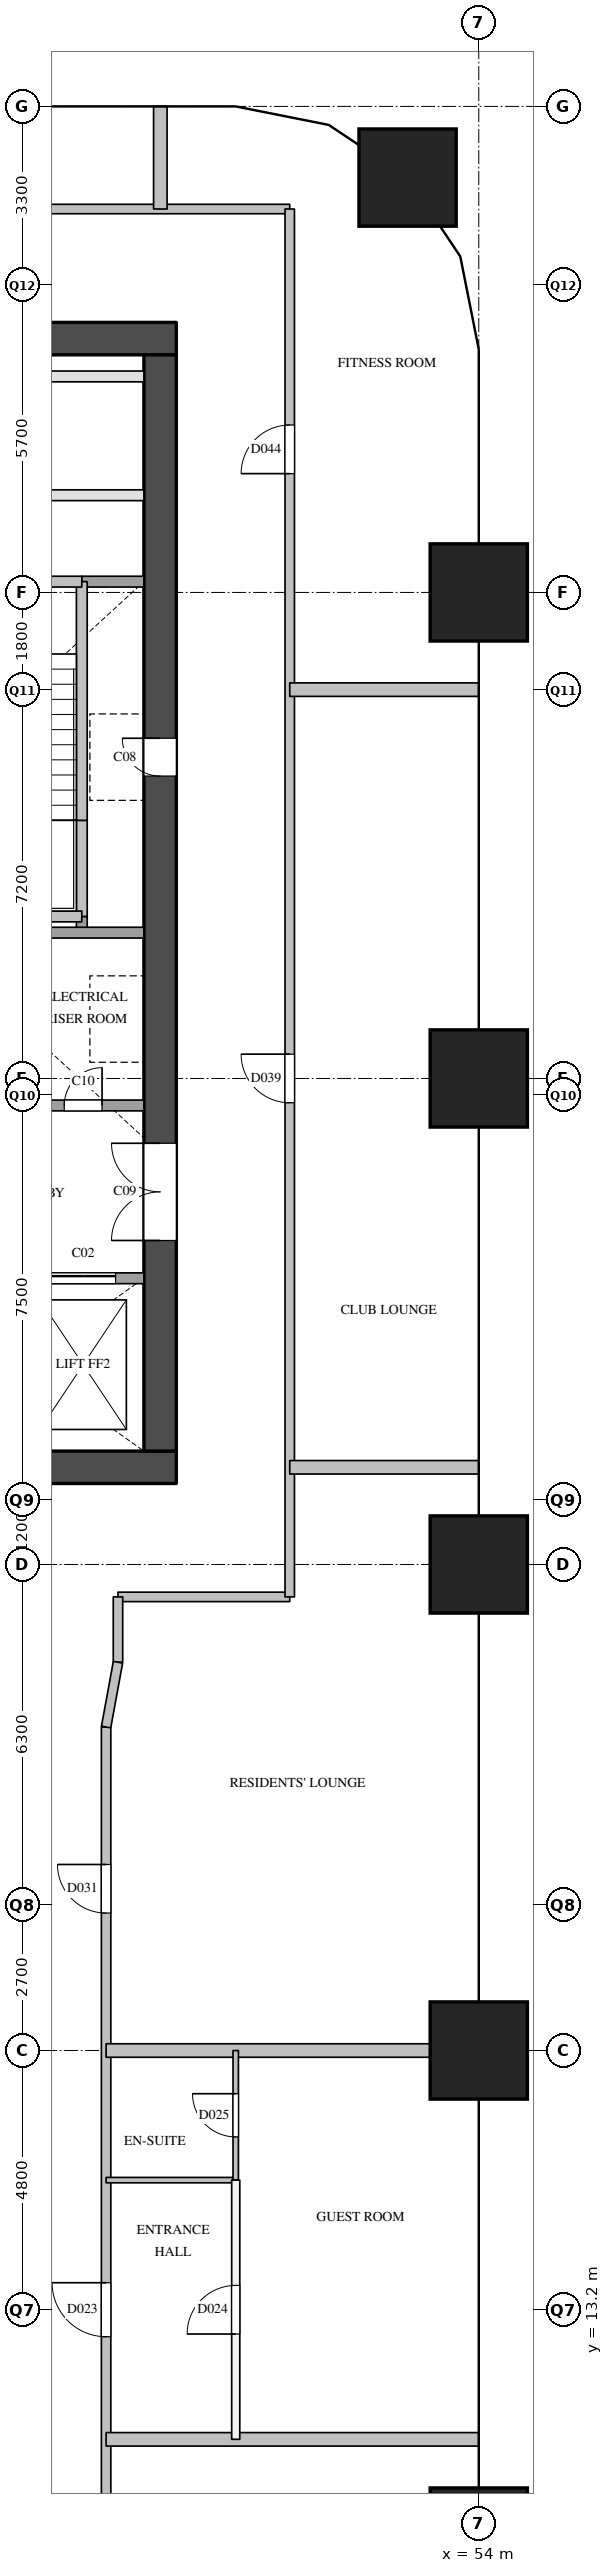
"""IFC4 building model, lengths in metres.
Left out: names, types, materials, properties, quantities, classifications, styles, units other than length and angle.
Written with IfcOpenShell. Run it as: python <this file> out.ifc"""

import sys

from ifc_helpers import new_model, si_unit, direction, frame, frame_2d, origin, origin_2d, place, context, subcontext, project, spatial, rectangle, extrude, element, fill, save


model = new_model("IFC4")
c1 = context("Model", 3, precision=1e-05, world=origin(), true_north=direction((0.0, 1.0)))
c2 = subcontext(c1, "Body", "Model", "MODEL_VIEW")
j1 = project(units=[si_unit("LENGTHUNIT", "METRE"), si_unit("PLANEANGLEUNIT", "RADIAN")], contexts=[c1])
p1 = place(None, origin())
s1 = spatial("IfcSite", under=j1, at=p1, CompositionType="ELEMENT")
p2 = place(p1, origin())
s2 = spatial("IfcBuilding", under=s1, at=p2, CompositionType="ELEMENT")
p3 = place(p2, frame((0.0, 0.0, 69.0)))
s3 = spatial("IfcBuildingStorey", under=s2, at=p3, CompositionType="ELEMENT", Elevation=69.0)
for number, where, z_axis, x_axis in (
    (1, (54.0, 9.0, 0.0), (0.0, 0.0, 1.0), (1.0, 0.0, 0.0)),
    (2, (54.0, 18.0, 0.0), (0.0, 0.0, 1.0), (1.0, 0.0, 0.0)),
    (3, (54.0, 27.0, 0.0), (0.0, 0.0, 1.0), (1.0, 0.0, 0.0)),
    (4, (54.0, 36.0, 0.0), (0.0, 0.0, 1.0), (1.0, 0.0, 0.0)),
    (5, (54.0, 45.0, 0.0), (0.0, 0.0, 1.0), (1.0, 0.0, 0.0)),
    (6, (52.682, 52.682, 0.0), (0.0, 0.0, 1.0), (1.0, 0.0, 0.0)),
):
    element("IfcColumn", number, at=place(p3, frame(where, z_axis=z_axis, x_axis=x_axis)), inside=s3, PredefinedType="COLUMN", context=c2, shape_type="SweptSolid", body=[
        extrude(rectangle(XDim=1.8, YDim=1.8, at=origin_2d()), origin(), (0.0, 0.0, 1.0), 3.8),
    ])
for number, where, z_axis, x_axis in (
    (7, (36.0, 28.8, 0.0), (0.0, 0.0, 1.0), (1.0, 0.0, 0.0)),
    (8, (36.0, 49.7, 0.0), (0.0, 0.0, 1.0), (1.0, 0.0, 0.0)),
):
    element("IfcWall", number, at=place(p3, frame(where, z_axis=z_axis, x_axis=x_axis)), inside=s3, PredefinedType="SHEAR", context=c2, shape_type="SweptSolid", body=[
        extrude(rectangle(XDim=12.4, YDim=0.6, at=frame_2d((6.2, 0.0))), origin(), (0.0, 0.0, 1.0), 3.5),
    ])
p4 = place(p3, frame((48.1, 29.1, 0.0), z_axis=(0.0, 0.0, 1.0), x_axis=(0.0, 1.0, 0.0)))
e9 = element("IfcWall", 9, at=p4, inside=s3, PredefinedType="SHEAR", context=c2, shape_type="SweptSolid", body=[
    extrude(rectangle(XDim=20.3, YDim=0.6, at=frame_2d((10.15, 0.0))), origin(), (0.0, 0.0, 1.0), 3.5),
])
p5 = place(p4, frame((12.5, 0.0, 0.0)))
e10 = element("IfcOpeningElement", 10, at=p5, cuts=e9, PredefinedType="OPENING", context=c2, shape_type="SweptSolid", body=[
    extrude(rectangle(XDim=0.7, YDim=2.1, at=frame_2d((0.35, 1.05))), frame((0.0, 0.31, 0.0), z_axis=(0.0, -1.0, 0.0), x_axis=(1.0, 0.0, 0.0)), (0.0, 0.0, 1.0), 0.62),
])
p6 = place(p4, frame((3.9, 0.0, 0.0)))
e11 = element("IfcOpeningElement", 11, at=p6, cuts=e9, PredefinedType="OPENING", context=c2, shape_type="SweptSolid", body=[
    extrude(rectangle(XDim=1.8, YDim=2.1, at=frame_2d((0.9, 1.05))), frame((0.0, 0.31, 0.0), z_axis=(0.0, -1.0, 0.0), x_axis=(1.0, 0.0, 0.0)), (0.0, 0.0, 1.0), 0.62),
])
p7 = place(p3, frame((46.65, 38.7, 0.0), z_axis=(0.0, 0.0, 1.0), x_axis=(0.0, 1.0, 0.0)))
e12 = element("IfcWall", 12, at=p7, inside=s3, PredefinedType="SOLIDWALL", context=c2, shape_type="SweptSolid", body=[
    extrude(rectangle(XDim=0.3, YDim=0.2, at=frame_2d((0.15, 0.0))), origin(), (0.0, 0.0, 1.0), 3.5),
])
p8 = place(p3, frame((46.65, 39.0, 0.0), z_axis=(0.0, 0.0, 1.0), x_axis=(0.0, 1.0, 0.0)))
e13 = element("IfcWall", 13, at=p8, inside=s3, PredefinedType="SOLIDWALL", context=c2, shape_type="SweptSolid", body=[
    extrude(rectangle(XDim=1.78, YDim=0.2, at=frame_2d((0.89, 0.0))), origin(), (0.0, 0.0, 1.0), 3.5),
])
p9 = place(p3, frame((46.65, 40.78, 0.0), z_axis=(0.0, 0.0, 1.0), x_axis=(0.0, 1.0, 0.0)))
e14 = element("IfcWall", 14, at=p9, inside=s3, PredefinedType="SOLIDWALL", context=c2, shape_type="SweptSolid", body=[
    extrude(rectangle(XDim=4.42, YDim=0.2, at=frame_2d((2.21, 0.0))), origin(), (0.0, 0.0, 1.0), 3.5),
])
p10 = place(p3, frame((36.6, 32.3, 0.0), z_axis=(0.0, 0.0, 1.0), x_axis=(1.0, 0.0, 0.0)))
e15 = element("IfcWall", 15, at=p10, inside=s3, PredefinedType="SOLIDWALL", context=c2, shape_type="SweptSolid", body=[
    extrude(rectangle(XDim=11.2, YDim=0.2, at=frame_2d((5.6, 0.0))), origin(), (0.0, 0.0, 1.0), 3.5),
])
p11 = place(p10, frame((7.225, 0.0, 0.0)))
e16 = element("IfcOpeningElement", 16, at=p11, cuts=e15, PredefinedType="OPENING", context=c2, shape_type="SweptSolid", body=[
    extrude(rectangle(XDim=1.2, YDim=2.1, at=frame_2d((0.6, 1.05))), frame((0.0, 0.11, 0.0), z_axis=(0.0, -1.0, 0.0), x_axis=(1.0, 0.0, 0.0)), (0.0, 0.0, 1.0), 0.22),
])
p12 = place(p10, frame((9.475, 0.0, 0.0)))
e17 = element("IfcOpeningElement", 17, at=p12, cuts=e15, PredefinedType="OPENING", context=c2, shape_type="SweptSolid", body=[
    extrude(rectangle(XDim=1.2, YDim=2.1, at=frame_2d((0.6, 1.05))), frame((0.0, 0.11, 0.0), z_axis=(0.0, -1.0, 0.0), x_axis=(1.0, 0.0, 0.0)), (0.0, 0.0, 1.0), 0.22),
])
p13 = place(p3, frame((43.3, 35.5, 0.0), z_axis=(0.0, 0.0, 1.0), x_axis=(1.0, 0.0, 0.0)))
e18 = element("IfcWall", 18, at=p13, inside=s3, PredefinedType="SOLIDWALL", context=c2, shape_type="SweptSolid", body=[
    extrude(rectangle(XDim=4.5, YDim=0.2, at=frame_2d((2.25, 0.0))), origin(), (0.0, 0.0, 1.0), 3.5),
])
p14 = place(p13, frame((0.525, 0.0, 0.0)))
e19 = element("IfcOpeningElement", 19, at=p14, cuts=e18, PredefinedType="OPENING", context=c2, shape_type="SweptSolid", body=[
    extrude(rectangle(XDim=1.2, YDim=2.1, at=frame_2d((0.6, 1.05))), frame((0.0, 0.11, 0.0), z_axis=(0.0, -1.0, 0.0), x_axis=(1.0, 0.0, 0.0)), (0.0, 0.0, 1.0), 0.22),
])
p15 = place(p13, frame((3.025, 0.0, 0.0)))
e20 = element("IfcOpeningElement", 20, at=p15, cuts=e18, PredefinedType="OPENING", context=c2, shape_type="SweptSolid", body=[
    extrude(rectangle(XDim=0.7, YDim=2.1, at=frame_2d((0.35, 1.05))), frame((0.0, 0.11, 0.0), z_axis=(0.0, -1.0, 0.0), x_axis=(1.0, 0.0, 0.0)), (0.0, 0.0, 1.0), 0.22),
])
p16 = place(p3, frame((43.3, 38.7, 0.0), z_axis=(0.0, 0.0, 1.0), x_axis=(1.0, 0.0, 0.0)))
e21 = element("IfcWall", 21, at=p16, inside=s3, PredefinedType="SOLIDWALL", context=c2, shape_type="SweptSolid", body=[
    extrude(rectangle(XDim=4.5, YDim=0.2, at=frame_2d((2.25, 0.0))), origin(), (0.0, 0.0, 1.0), 3.5),
])
p17 = place(p3, frame((43.4, 39.0, 0.0), z_axis=(0.0, 0.0, 1.0), x_axis=(1.0, 0.0, 0.0)))
e22 = element("IfcWall", 22, at=p17, inside=s3, PredefinedType="SOLIDWALL", context=c2, shape_type="SweptSolid", body=[
    extrude(rectangle(XDim=3.25, YDim=0.2, at=frame_2d((1.625, 0.0))), origin(), (0.0, 0.0, 1.0), 3.5),
])
p18 = place(p3, frame((46.65, 45.2, 0.0), z_axis=(0.0, 0.0, 1.0), x_axis=(1.0, 0.0, 0.0)))
e23 = element("IfcWall", 23, at=p18, inside=s3, PredefinedType="SOLIDWALL", context=c2, shape_type="SweptSolid", body=[
    extrude(rectangle(XDim=1.15, YDim=0.2, at=frame_2d((0.575, 0.0))), origin(), (0.0, 0.0, 1.0), 3.5),
])
p19 = place(p3, frame((36.6, 45.2, 0.0), z_axis=(0.0, 0.0, 1.0), x_axis=(1.0, 0.0, 0.0)))
e24 = element("IfcWall", 24, at=p19, inside=s3, PredefinedType="SOLIDWALL", context=c2, shape_type="SweptSolid", body=[
    extrude(rectangle(XDim=10.05, YDim=0.2, at=frame_2d((5.025, 0.0))), origin(), (0.0, 0.0, 1.0), 3.5),
])
p20 = place(p19, frame((1.125, 0.0, 0.0)))
e25 = element("IfcOpeningElement", 25, at=p20, cuts=e24, PredefinedType="OPENING", context=c2, shape_type="SweptSolid", body=[
    extrude(rectangle(XDim=1.1, YDim=2.1, at=frame_2d((0.55, 1.05))), frame((0.0, 0.11, 0.0), z_axis=(0.0, -1.0, 0.0), x_axis=(1.0, 0.0, 0.0)), (0.0, 0.0, 1.0), 0.22),
])
p21 = place(p19, frame((4.475, 0.0, 0.0)))
e26 = element("IfcOpeningElement", 26, at=p21, cuts=e24, PredefinedType="OPENING", context=c2, shape_type="SweptSolid", body=[
    extrude(rectangle(XDim=1.1, YDim=2.1, at=frame_2d((0.55, 1.05))), frame((0.0, 0.11, 0.0), z_axis=(0.0, -1.0, 0.0), x_axis=(1.0, 0.0, 0.0)), (0.0, 0.0, 1.0), 0.22),
])
p22 = place(p19, frame((7.825, 0.0, 0.0)))
e27 = element("IfcOpeningElement", 27, at=p22, cuts=e24, PredefinedType="OPENING", context=c2, shape_type="SweptSolid", body=[
    extrude(rectangle(XDim=1.1, YDim=2.1, at=frame_2d((0.55, 1.05))), frame((0.0, 0.11, 0.0), z_axis=(0.0, -1.0, 0.0), x_axis=(1.0, 0.0, 0.0)), (0.0, 0.0, 1.0), 0.22),
])
p23 = place(p3, frame((36.6, 46.8, 0.0), z_axis=(0.0, 0.0, 1.0), x_axis=(1.0, 0.0, 0.0)))
e28 = element("IfcWall", 28, at=p23, inside=s3, PredefinedType="PARTITIONING", context=c2, shape_type="SweptSolid", body=[
    extrude(rectangle(XDim=11.2, YDim=0.2, at=frame_2d((5.6, 0.0))), origin(), (0.0, 0.0, 1.0), 3.5),
])
p24 = place(p23, frame((2.07, 0.0, 0.0)))
e29 = element("IfcOpeningElement", 29, at=p24, cuts=e28, PredefinedType="OPENING", context=c2, shape_type="SweptSolid", body=[
    extrude(rectangle(XDim=0.9, YDim=2.1, at=frame_2d((0.45, 1.05))), frame((0.0, 0.11, 0.0), z_axis=(0.0, -1.0, 0.0), x_axis=(1.0, 0.0, 0.0)), (0.0, 0.0, 1.0), 0.22),
])
p25 = place(p23, frame((7.67, 0.0, 0.0)))
e30 = element("IfcOpeningElement", 30, at=p25, cuts=e28, PredefinedType="OPENING", context=c2, shape_type="SweptSolid", body=[
    extrude(rectangle(XDim=0.9, YDim=2.1, at=frame_2d((0.45, 1.05))), frame((0.0, 0.11, 0.0), z_axis=(0.0, -1.0, 0.0), x_axis=(1.0, 0.0, 0.0)), (0.0, 0.0, 1.0), 0.22),
])
p26 = place(p3, frame((36.6, 49.0, 0.0), z_axis=(0.0, 0.0, 1.0), x_axis=(1.0, 0.0, 0.0)))
e31 = element("IfcWall", 31, at=p26, inside=s3, PredefinedType="PARTITIONING", context=c2, shape_type="SweptSolid", body=[
    extrude(rectangle(XDim=11.2, YDim=0.2, at=frame_2d((5.6, 0.0))), origin(), (0.0, 0.0, 1.0), 3.5),
])
p27 = place(p3, frame((47.32, 26.4, 0.0), z_axis=(0.0, 0.0, 1.0), x_axis=(1.0, 0.0, 0.0)))
e32 = element("IfcWall", 32, at=p27, inside=s3, PredefinedType="PARTITIONING", context=c2, shape_type="SweptSolid", body=[
    extrude(rectangle(XDim=3.18, YDim=0.175, at=frame_2d((1.59, 0.0))), origin(), (0.0, 0.0, 1.0), 3.5),
])
p28 = place(p3, frame((33.9, 52.1, 0.0), z_axis=(0.0, 0.0, 1.0), x_axis=(1.0, 0.0, 0.0)))
e33 = element("IfcWall", 33, at=p28, inside=s3, PredefinedType="PARTITIONING", context=c2, shape_type="SweptSolid", body=[
    extrude(rectangle(XDim=16.6, YDim=0.175, at=frame_2d((8.3, 0.0))), origin(), (0.0, 0.0, 1.0), 3.5),
])
p29 = place(p28, frame((7.702, 0.0, 0.0)))
e34 = element("IfcOpeningElement", 34, at=p29, cuts=e33, PredefinedType="OPENING", context=c2, shape_type="SweptSolid", body=[
    extrude(rectangle(XDim=0.9, YDim=2.1, at=frame_2d((0.45, 1.05))), frame((0.0, 0.097, 0.0), z_axis=(0.0, -1.0, 0.0), x_axis=(1.0, 0.0, 0.0)), (0.0, 0.0, 1.0), 0.195),
])
p30 = place(p3, frame((47.1, 6.9, 0.0), z_axis=(0.0, 0.0, 1.0), x_axis=(0.0, 1.0, 0.0)))
e35 = element("IfcWall", 35, at=p30, inside=s3, PredefinedType="PARTITIONING", context=c2, shape_type="SweptSolid", body=[
    extrude(rectangle(XDim=17.09, YDim=0.175, at=frame_2d((8.545, 0.0))), origin(), (0.0, 0.0, 1.0), 3.5),
])
p31 = place(p30, frame((1.5, 0.0, 0.0)))
e36 = element("IfcOpeningElement", 36, at=p31, cuts=e35, PredefinedType="OPENING", context=c2, shape_type="SweptSolid", body=[
    extrude(rectangle(XDim=0.9, YDim=2.1, at=frame_2d((0.45, 1.05))), frame((0.0, 0.097, 0.0), z_axis=(0.0, -1.0, 0.0), x_axis=(1.0, 0.0, 0.0)), (0.0, 0.0, 1.0), 0.195),
])
p32 = place(p30, frame((5.8, 0.0, 0.0)))
e37 = element("IfcOpeningElement", 37, at=p32, cuts=e35, PredefinedType="OPENING", context=c2, shape_type="SweptSolid", body=[
    extrude(rectangle(XDim=1.0, YDim=2.1, at=frame_2d((0.5, 1.05))), frame((0.0, 0.097, 0.0), z_axis=(0.0, -1.0, 0.0), x_axis=(1.0, 0.0, 0.0)), (0.0, 0.0, 1.0), 0.195),
])
p33 = place(p30, frame((13.645, 0.0, 0.0)))
e38 = element("IfcOpeningElement", 38, at=p33, cuts=e35, PredefinedType="OPENING", context=c2, shape_type="SweptSolid", body=[
    extrude(rectangle(XDim=0.9, YDim=2.1, at=frame_2d((0.45, 1.05))), frame((0.0, 0.097, 0.0), z_axis=(0.0, -1.0, 0.0), x_axis=(1.0, 0.0, 0.0)), (0.0, 0.0, 1.0), 0.195),
])
p34 = place(p3, frame((47.32, 25.19, 0.0), z_axis=(0.0, 0.0, 1.0), x_axis=(0.0, 1.0, 0.0)))
e39 = element("IfcWall", 39, at=p34, inside=s3, PredefinedType="PARTITIONING", context=c2, shape_type="SweptSolid", body=[
    extrude(rectangle(XDim=1.21, YDim=0.175, at=frame_2d((0.605, 0.0))), origin(), (0.0, 0.0, 1.0), 3.5),
])
p35 = place(p3, frame((50.5, 26.4, 0.0), z_axis=(0.0, 0.0, 1.0), x_axis=(0.0, 1.0, 0.0)))
e40 = element("IfcWall", 40, at=p35, inside=s3, PredefinedType="PARTITIONING", context=c2, shape_type="SweptSolid", body=[
    extrude(rectangle(XDim=25.7, YDim=0.175, at=frame_2d((12.85, 0.0))), origin(), (0.0, 0.0, 1.0), 2.5),
])
p36 = place(p35, frame((9.15, 0.0, 0.0)))
e41 = element("IfcOpeningElement", 41, at=p36, cuts=e40, PredefinedType="OPENING", context=c2, shape_type="SweptSolid", body=[
    extrude(rectangle(XDim=0.9, YDim=2.1, at=frame_2d((0.45, 1.05))), frame((0.0, 0.097, 0.0), z_axis=(0.0, -1.0, 0.0), x_axis=(1.0, 0.0, 0.0)), (0.0, 0.0, 1.0), 0.195),
])
p37 = place(p35, frame((20.8, 0.0, 0.0)))
e42 = element("IfcOpeningElement", 42, at=p37, cuts=e40, PredefinedType="OPENING", context=c2, shape_type="SweptSolid", body=[
    extrude(rectangle(XDim=0.9, YDim=2.1, at=frame_2d((0.45, 1.05))), frame((0.0, 0.097, 0.0), z_axis=(0.0, -1.0, 0.0), x_axis=(1.0, 0.0, 0.0)), (0.0, 0.0, 1.0), 0.195),
])
p38 = place(p3, frame((49.5, 10.8, 0.0), z_axis=(0.0, 0.0, 1.0), x_axis=(0.0, 1.0, 0.0)))
e43 = element("IfcWall", 43, at=p38, inside=s3, PredefinedType="PARTITIONING", context=c2, shape_type="SweptSolid", body=[
    extrude(rectangle(XDim=4.8, YDim=0.15, at=frame_2d((2.4, 0.0))), origin(), (0.0, 0.0, 1.0), 3.5),
])
p39 = place(p38, frame((1.95, 0.0, 0.0)))
e44 = element("IfcOpeningElement", 44, at=p39, cuts=e43, PredefinedType="OPENING", context=c2, shape_type="SweptSolid", body=[
    extrude(rectangle(XDim=0.9, YDim=2.1, at=frame_2d((0.45, 1.05))), frame((0.0, 0.085, 0.0), z_axis=(0.0, -1.0, 0.0), x_axis=(1.0, 0.0, 0.0)), (0.0, 0.0, 1.0), 0.17),
])
p40 = place(p3, frame((47.1, 10.8, 0.0), z_axis=(0.0, 0.0, 1.0), x_axis=(1.0, 0.0, 0.0)))
e45 = element("IfcWall", 45, at=p40, inside=s3, PredefinedType="PARTITIONING", context=c2, shape_type="SweptSolid", body=[
    extrude(rectangle(XDim=6.9, YDim=0.25, at=frame_2d((3.45, 0.0))), origin(), (0.0, 0.0, 1.0), 2.5),
])
p41 = place(p3, frame((47.1, 18.0, 0.0), z_axis=(0.0, 0.0, 1.0), x_axis=(1.0, 0.0, 0.0)))
e46 = element("IfcWall", 46, at=p41, inside=s3, PredefinedType="PARTITIONING", context=c2, shape_type="SweptSolid", body=[
    extrude(rectangle(XDim=6.9, YDim=0.25, at=frame_2d((3.45, 0.0))), origin(), (0.0, 0.0, 1.0), 3.5),
])
for number, where, z_axis, x_axis in (
    (47, (50.5, 28.8, 0.0), (0.0, 0.0, 1.0), (1.0, 0.0, 0.0)),
    (48, (50.5, 43.2, 0.0), (0.0, 0.0, 1.0), (1.0, 0.0, 0.0)),
):
    element("IfcWall", number, at=place(p3, frame(where, z_axis=z_axis, x_axis=x_axis)), inside=s3, PredefinedType="PARTITIONING", context=c2, shape_type="SweptSolid", body=[
        extrude(rectangle(XDim=3.5, YDim=0.25, at=frame_2d((1.75, 0.0))), origin(), (0.0, 0.0, 1.0), 2.5),
    ])
p42 = place(p3, frame((48.104, 52.1, 0.0), z_axis=(0.0, 0.0, 1.0), x_axis=(0.0, 1.0, 0.0)))
e49 = element("IfcWall", 49, at=p42, inside=s3, PredefinedType="PARTITIONING", context=c2, shape_type="SweptSolid", body=[
    extrude(rectangle(XDim=1.9, YDim=0.25, at=frame_2d((0.95, 0.0))), origin(), (0.0, 0.0, 1.0), 2.5),
])
p43 = place(p3, frame((47.1, 15.6, 0.0), z_axis=(0.0, 0.0, 1.0), x_axis=(1.0, 0.0, 0.0)))
e50 = element("IfcWall", 50, at=p43, inside=s3, PredefinedType="PARTITIONING", context=c2, shape_type="SweptSolid", body=[
    extrude(rectangle(XDim=2.4, YDim=0.1, at=frame_2d((1.2, 0.0))), origin(), (0.0, 0.0, 1.0), 3.5),
])
p44 = place(p3, frame((49.5, 15.6, 0.0), z_axis=(0.0, 0.0, 1.0), x_axis=(0.0, 1.0, 0.0)))
e51 = element("IfcWall", 51, at=p44, inside=s3, PredefinedType="PARTITIONING", context=c2, shape_type="SweptSolid", body=[
    extrude(rectangle(XDim=2.4, YDim=0.1, at=frame_2d((1.2, 0.0))), origin(), (0.0, 0.0, 1.0), 3.5),
])
p45 = place(p44, frame((0.8, 0.0, 0.0)))
e52 = element("IfcOpeningElement", 52, at=p45, cuts=e51, PredefinedType="OPENING", context=c2, shape_type="SweptSolid", body=[
    extrude(rectangle(XDim=0.8, YDim=2.1, at=frame_2d((0.4, 1.05))), frame((0.0, 0.06, 0.0), z_axis=(0.0, -1.0, 0.0), x_axis=(1.0, 0.0, 0.0)), (0.0, 0.0, 1.0), 0.12),
])
p46 = place(p3, frame((47.32, 25.19, 0.0), z_axis=(0.0, 0.0, 1.0), x_axis=(-0.180311734132, -0.983609515272, 0.0)))
e53 = element("IfcWall", 53, at=p46, inside=s3, PredefinedType="PARTITIONING", context=c2, shape_type="SweptSolid", body=[
    extrude(rectangle(XDim=1.22, YDim=0.175, at=frame_2d((0.61, 0.0))), origin(), (0.0, 0.0, 1.0), 3.5),
])
p47 = place(p12, origin())
e54 = element("IfcDoor", 54, at=p47, inside=s3, OperationType="SLIDING_TO_LEFT", PredefinedType="DOOR", context=c2, shape_type="SweptSolid", body=[
    extrude(rectangle(XDim=1.2, YDim=2.1, at=frame_2d((0.6, 1.05))), frame((0.0, 0.025, 0.0), z_axis=(0.0, -1.0, 0.0), x_axis=(1.0, 0.0, 0.0)), (0.0, 0.0, 1.0), 0.05),
])
fill(e17, e54)
p48 = place(p5, origin())
e55 = element("IfcDoor", 55, at=p48, inside=s3, OperationType="SINGLE_SWING_RIGHT", PredefinedType="DOOR", context=c2, shape_type="SweptSolid", body=[
    extrude(rectangle(XDim=0.7, YDim=2.1, at=frame_2d((0.35, 1.05))), frame((0.0, 0.025, 0.0), z_axis=(0.0, -1.0, 0.0), x_axis=(1.0, 0.0, 0.0)), (0.0, 0.0, 1.0), 0.05),
])
fill(e10, e55)
p49 = place(p6, origin())
e56 = element("IfcDoor", 56, at=p49, inside=s3, OperationType="DOUBLE_DOOR_SINGLE_SWING", PredefinedType="DOOR", context=c2, shape_type="SweptSolid", body=[
    extrude(rectangle(XDim=1.8, YDim=2.1, at=frame_2d((0.9, 1.05))), frame((0.0, 0.025, 0.0), z_axis=(0.0, -1.0, 0.0), x_axis=(1.0, 0.0, 0.0)), (0.0, 0.0, 1.0), 0.05),
])
fill(e11, e56)
p50 = place(p15, origin())
e57 = element("IfcDoor", 57, at=p50, inside=s3, OperationType="SINGLE_SWING_RIGHT", PredefinedType="DOOR", context=c2, shape_type="SweptSolid", body=[
    extrude(rectangle(XDim=0.7, YDim=2.1, at=frame_2d((0.35, 1.05))), frame((0.0, 0.025, 0.0), z_axis=(0.0, -1.0, 0.0), x_axis=(1.0, 0.0, 0.0)), (0.0, 0.0, 1.0), 0.05),
])
fill(e20, e57)
p51 = place(p32, origin())
e58 = element("IfcDoor", 58, at=p51, inside=s3, OperationType="SINGLE_SWING_RIGHT", PredefinedType="DOOR", context=c2, shape_type="SweptSolid", body=[
    extrude(rectangle(XDim=1.0, YDim=2.1, at=frame_2d((0.5, 1.05))), frame((0.0, 0.025, 0.0), z_axis=(0.0, -1.0, 0.0), x_axis=(1.0, 0.0, 0.0)), (0.0, 0.0, 1.0), 0.05),
])
fill(e37, e58)
p52 = place(p39, origin())
e59 = element("IfcDoor", 59, at=p52, inside=s3, OperationType="SINGLE_SWING_LEFT", PredefinedType="DOOR", context=c2, shape_type="SweptSolid", body=[
    extrude(rectangle(XDim=0.9, YDim=2.1, at=frame_2d((0.45, 1.05))), frame((0.0, 0.025, 0.0), z_axis=(0.0, -1.0, 0.0), x_axis=(1.0, 0.0, 0.0)), (0.0, 0.0, 1.0), 0.05),
])
fill(e44, e59)
p53 = place(p45, origin())
e60 = element("IfcDoor", 60, at=p53, inside=s3, OperationType="SINGLE_SWING_RIGHT", PredefinedType="DOOR", context=c2, shape_type="SweptSolid", body=[
    extrude(rectangle(XDim=0.8, YDim=2.1, at=frame_2d((0.4, 1.05))), frame((0.0, 0.025, 0.0), z_axis=(0.0, -1.0, 0.0), x_axis=(1.0, 0.0, 0.0)), (0.0, 0.0, 1.0), 0.05),
])
fill(e52, e60)
p54 = place(p33, origin())
e61 = element("IfcDoor", 61, at=p54, inside=s3, OperationType="SINGLE_SWING_RIGHT", PredefinedType="DOOR", context=c2, shape_type="SweptSolid", body=[
    extrude(rectangle(XDim=0.9, YDim=2.1, at=frame_2d((0.45, 1.05))), frame((0.0, 0.025, 0.0), z_axis=(0.0, -1.0, 0.0), x_axis=(1.0, 0.0, 0.0)), (0.0, 0.0, 1.0), 0.05),
])
fill(e38, e61)
p55 = place(p36, origin())
e62 = element("IfcDoor", 62, at=p55, inside=s3, OperationType="SINGLE_SWING_RIGHT", PredefinedType="DOOR", context=c2, shape_type="SweptSolid", body=[
    extrude(rectangle(XDim=0.9, YDim=2.1, at=frame_2d((0.45, 1.05))), frame((0.0, 0.025, 0.0), z_axis=(0.0, -1.0, 0.0), x_axis=(1.0, 0.0, 0.0)), (0.0, 0.0, 1.0), 0.05),
])
fill(e41, e62)
p56 = place(p37, origin())
e63 = element("IfcDoor", 63, at=p56, inside=s3, OperationType="SINGLE_SWING_LEFT", PredefinedType="DOOR", context=c2, shape_type="SweptSolid", body=[
    extrude(rectangle(XDim=0.9, YDim=2.1, at=frame_2d((0.45, 1.05))), frame((0.0, 0.025, 0.0), z_axis=(0.0, -1.0, 0.0), x_axis=(1.0, 0.0, 0.0)), (0.0, 0.0, 1.0), 0.05),
])
fill(e42, e63)
save(model, sys.argv[1])
